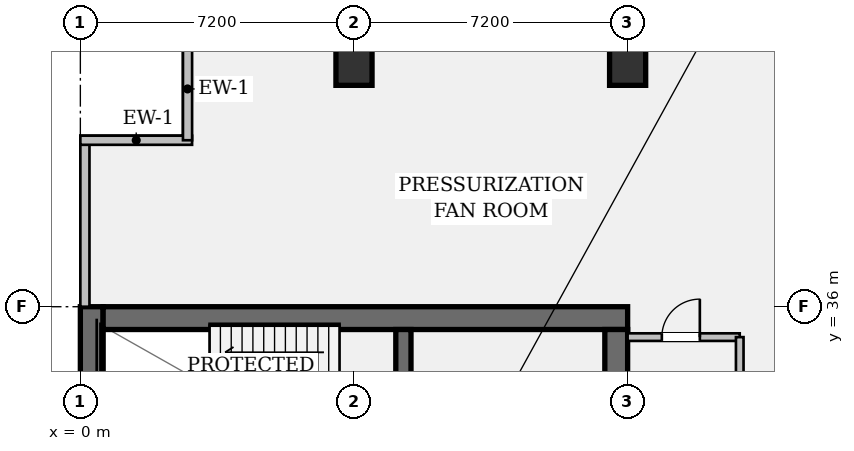
"""IFC4 building model, lengths in metres.
Left out: names, types, materials, properties, quantities, classifications, styles, units other than length and angle.
Written with IfcOpenShell. Run it as: python <this file> out.ifc"""

import sys

from ifc_helpers import new_model, si_unit, direction, frame, frame_2d, origin, origin_2d, place, context, subcontext, project, spatial, rectangle, hollow_rectangle, extrude, element, fill, save


model = new_model("IFC4")
c1 = context("Model", 3, precision=1e-05, world=origin(), true_north=direction((0.0, 1.0)))
c2 = subcontext(c1, "Body", "Model", "MODEL_VIEW")
j1 = project(units=[si_unit("LENGTHUNIT", "METRE"), si_unit("PLANEANGLEUNIT", "RADIAN")], contexts=[c1])
p1 = place(None, origin())
s1 = spatial("IfcSite", under=j1, at=p1, CompositionType="ELEMENT")
p2 = place(p1, origin())
s2 = spatial("IfcBuilding", under=s1, at=p2, CompositionType="ELEMENT")
p3 = place(p2, frame((0.0, 0.0, 92.75)))
s3 = spatial("IfcBuildingStorey", under=s2, at=p3, CompositionType="ELEMENT", Elevation=92.75)
p4 = place(p3, frame((0.3, 7.2, 0.0), z_axis=(0.0, 0.0, 1.0), x_axis=(0.0, 1.0, 0.0)))
e1 = element("IfcWall", 1, at=p4, inside=s3, PredefinedType="SHEAR", context=c2, shape_type="SweptSolid", body=[
    extrude(rectangle(XDim=28.8, YDim=0.6, at=frame_2d((14.4, 0.0))), origin(), (0.0, 0.0, 1.0), 4.6),
])
p5 = place(p3, frame((0.6, 35.7, 0.0), z_axis=(0.0, 0.0, 1.0), x_axis=(1.0, 0.0, 0.0)))
e2 = element("IfcWall", 2, at=p5, inside=s3, PredefinedType="SHEAR", context=c2, shape_type="SweptSolid", body=[
    extrude(rectangle(XDim=13.8, YDim=0.6, at=frame_2d((6.9, 0.0))), origin(), (0.0, 0.0, 1.0), 4.6),
])
p6 = place(p3, frame((14.1, 35.4, 0.0), z_axis=(0.0, 0.0, 1.0), x_axis=(0.0, -1.0, 0.0)))
e3 = element("IfcWall", 3, at=p6, inside=s3, PredefinedType="SHEAR", context=c2, shape_type="SweptSolid", body=[
    extrude(rectangle(XDim=27.6, YDim=0.6, at=frame_2d((13.8, 0.0))), origin(), (0.0, 0.0, 1.0), 4.6),
])
p7 = place(p6, frame((1.3, 0.0, 0.0)))
e4 = element("IfcOpeningElement", 4, at=p7, cuts=e3, PredefinedType="OPENING", context=c2, shape_type="SweptSolid", body=[
    extrude(rectangle(XDim=1.2, YDim=2.15, at=frame_2d((0.6, 1.075))), frame((0.0, 0.312, 0.0), z_axis=(0.0, -1.0, 0.0), x_axis=(1.0, 0.0, 0.0)), (0.0, 0.0, 1.0), 0.624),
])
p8 = place(p6, frame((25.25, 0.0, 0.0)))
e5 = element("IfcOpeningElement", 5, at=p8, cuts=e3, PredefinedType="OPENING", context=c2, shape_type="SweptSolid", body=[
    extrude(rectangle(XDim=1.2, YDim=2.15, at=frame_2d((0.6, 1.075))), frame((0.0, 0.312, 0.0), z_axis=(0.0, -1.0, 0.0), x_axis=(1.0, 0.0, 0.0)), (0.0, 0.0, 1.0), 0.624),
])
p9 = place(p6, frame((14.6, 0.0, 0.0)))
e6 = element("IfcOpeningElement", 6, at=p9, cuts=e3, PredefinedType="OPENING", context=c2, shape_type="SweptSolid", body=[
    extrude(rectangle(XDim=1.6, YDim=2.2, at=frame_2d((0.8, 1.1))), frame((0.0, 0.312, 0.0), z_axis=(0.0, -1.0, 0.0), x_axis=(1.0, 0.0, 0.0)), (0.0, 0.0, 1.0), 0.624),
])
p10 = place(p3, frame((8.5, 31.72, 0.0), z_axis=(0.0, 0.0, 1.0), x_axis=(0.0, 1.0, 0.0)))
e7 = element("IfcWall", 7, at=p10, inside=s3, PredefinedType="SHEAR", context=c2, shape_type="SweptSolid", body=[
    extrude(rectangle(XDim=3.68, YDim=0.4, at=frame_2d((1.84, 0.0))), origin(), (0.0, 0.0, 1.0), 4.6),
])
p11 = place(p10, frame((0.9, 0.0, 0.0)))
e8 = element("IfcOpeningElement", 8, at=p11, cuts=e7, PredefinedType="OPENING", context=c2, shape_type="SweptSolid", body=[
    extrude(rectangle(XDim=1.1, YDim=2.15, at=frame_2d((0.55, 1.075))), frame((0.0, 0.212, 0.0), z_axis=(0.0, -1.0, 0.0), x_axis=(1.0, 0.0, 0.0)), (0.0, 0.0, 1.0), 0.424),
])
for number, where, z_axis, x_axis in (
    (9, (7.2, 42.3, 0.0), (0.0, 0.0, 1.0), (1.0, 0.0, 0.0)),
    (10, (14.4, 42.3, 0.0), (0.0, 0.0, 1.0), (1.0, 0.0, 0.0)),
):
    element("IfcColumn", number, at=place(p3, frame(where, z_axis=z_axis, x_axis=x_axis)), inside=s3, PredefinedType="COLUMN", context=c2, shape_type="SweptSolid", body=[
        extrude(hollow_rectangle(XDim=0.95, YDim=0.95, WallThickness=0.06, at=origin_2d()), origin(), (0.0, 0.0, 1.0), 4.6),
    ])
p12 = place(p3, frame((0.12, 36.0, 0.0), z_axis=(0.0, 0.0, 1.0), x_axis=(0.0, 1.0, 0.0)))
e11 = element("IfcWall", 11, at=p12, inside=s3, PredefinedType="STANDARD", context=c2, shape_type="SweptSolid", body=[
    extrude(rectangle(XDim=4.38, YDim=0.24, at=frame_2d((2.19, 0.0))), origin(), (0.0, 0.0, 1.0), 4.6),
])
p13 = place(p3, frame((0.0, 40.38, 0.0), z_axis=(0.0, 0.0, 1.0), x_axis=(1.0, 0.0, 0.0)))
e12 = element("IfcWall", 12, at=p13, inside=s3, PredefinedType="STANDARD", context=c2, shape_type="SweptSolid", body=[
    extrude(rectangle(XDim=2.94, YDim=0.24, at=frame_2d((1.47, 0.0))), origin(), (0.0, 0.0, 1.0), 4.6),
])
p14 = place(p3, frame((2.82, 40.38, 0.0), z_axis=(0.0, 0.0, 1.0), x_axis=(0.0, 1.0, 0.0)))
e13 = element("IfcWall", 13, at=p14, inside=s3, PredefinedType="STANDARD", context=c2, shape_type="SweptSolid", body=[
    extrude(rectangle(XDim=2.7, YDim=0.24, at=frame_2d((1.35, 0.0))), origin(), (0.0, 0.0, 1.0), 4.6),
])
p15 = place(p3, frame((14.4, 35.2, 0.0), z_axis=(0.0, 0.0, 1.0), x_axis=(1.0, 0.0, 0.0)))
e14 = element("IfcWall", 14, at=p15, inside=s3, PredefinedType="PARTITIONING", context=c2, shape_type="SweptSolid", body=[
    extrude(rectangle(XDim=2.95, YDim=0.2, at=frame_2d((1.475, 0.0))), origin(), (0.0, 0.0, 1.0), 3.813),
])
p16 = place(p15, frame((0.9, 0.0, 0.0)))
e15 = element("IfcOpeningElement", 15, at=p16, cuts=e14, PredefinedType="OPENING", context=c2, shape_type="SweptSolid", body=[
    extrude(rectangle(XDim=1.0, YDim=2.15, at=frame_2d((0.5, 1.075))), frame((0.0, 0.112, 0.0), z_axis=(0.0, -1.0, 0.0), x_axis=(1.0, 0.0, 0.0)), (0.0, 0.0, 1.0), 0.224),
])
p17 = place(p3, frame((17.35, 13.9, 0.0), z_axis=(0.0, 0.0, 1.0), x_axis=(0.0, 1.0, 0.0)))
e16 = element("IfcWall", 16, at=p17, inside=s3, PredefinedType="PARTITIONING", context=c2, shape_type="SweptSolid", body=[
    extrude(rectangle(XDim=21.3, YDim=0.2, at=frame_2d((10.65, 0.0))), origin(), (0.0, 0.0, 1.0), 3.813),
])
p18 = place(p17, frame((17.6, 0.0, 0.0)))
e17 = element("IfcOpeningElement", 17, at=p18, cuts=e16, PredefinedType="OPENING", context=c2, shape_type="SweptSolid", body=[
    extrude(rectangle(XDim=1.2, YDim=2.15, at=frame_2d((0.6, 1.075))), frame((0.0, 0.112, 0.0), z_axis=(0.0, -1.0, 0.0), x_axis=(1.0, 0.0, 0.0)), (0.0, 0.0, 1.0), 0.224),
])
p19 = place(p16, origin())
e18 = element("IfcDoor", 18, at=p19, inside=s3, OperationType="SINGLE_SWING_RIGHT", PredefinedType="DOOR", context=c2, shape_type="SweptSolid", body=[
    extrude(rectangle(XDim=1.0, YDim=2.15, at=frame_2d((0.5, 1.075))), frame((0.0, 0.025, 0.0), z_axis=(0.0, -1.0, 0.0), x_axis=(1.0, 0.0, 0.0)), (0.0, 0.0, 1.0), 0.05),
])
fill(e15, e18)
save(model, sys.argv[1])
